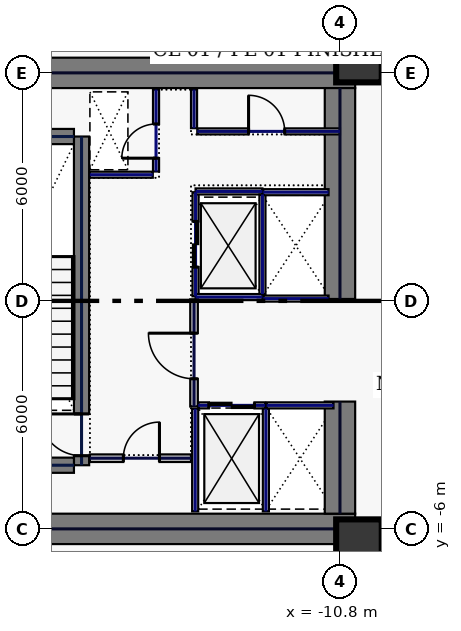
"""IFC4 building model, lengths in metres.
Left out: names, types, materials, properties, quantities, classifications, styles, units other than length and angle.
Written with IfcOpenShell. Run it as: python <this file> out.ifc"""

import sys

from ifc_helpers import new_model, si_unit, direction, frame, frame_2d, origin, origin_2d, place, context, subcontext, project, spatial, rectangle, hollow_rectangle, extrude, element, fill, save


model = new_model("IFC4")
c1 = context("Model", 3, precision=1e-05, world=origin(), true_north=direction((0.0, 1.0)))
c2 = subcontext(c1, "Body", "Model", "MODEL_VIEW")
j1 = project(units=[si_unit("LENGTHUNIT", "METRE"), si_unit("PLANEANGLEUNIT", "RADIAN")], contexts=[c1])
p1 = place(None, origin())
s1 = spatial("IfcSite", under=j1, at=p1, CompositionType="ELEMENT")
p2 = place(p1, origin())
s2 = spatial("IfcBuilding", under=s1, at=p2, CompositionType="ELEMENT")
p3 = place(p2, frame((0.0, 0.0, 39.4)))
s3 = spatial("IfcBuildingStorey", under=s2, at=p3, CompositionType="ELEMENT", Elevation=39.4)
for number, where, z_axis, x_axis in (
    (1, (-22.0, 6.0, 0.0), (0.0, 0.0, 1.0), (1.0, 0.0, 0.0)),
    (2, (-22.0, -6.0, 0.0), (0.0, 0.0, 1.0), (1.0, 0.0, 0.0)),
):
    element("IfcWall", number, at=place(p3, frame(where, z_axis=z_axis, x_axis=x_axis)), inside=s3, PredefinedType="SHEAR", context=c2, shape_type="SweptSolid", body=[
        extrude(rectangle(XDim=11.6, YDim=0.8, at=frame_2d((5.8, 0.0))), origin(), (0.0, 0.0, 1.0), 3.74),
    ])
p4 = place(p3, frame((-10.8, -5.6, 0.0), z_axis=(0.0, 0.0, 1.0), x_axis=(0.0, 1.0, 0.0)))
e3 = element("IfcWall", 3, at=p4, inside=s3, PredefinedType="SHEAR", context=c2, shape_type="SweptSolid", body=[
    extrude(rectangle(XDim=2.95, YDim=0.8, at=frame_2d((1.475, 0.0))), origin(), (0.0, 0.0, 1.0), 3.74),
])
p5 = place(p3, frame((-10.8, 0.05, 0.0), z_axis=(0.0, 0.0, 1.0), x_axis=(0.0, 1.0, 0.0)))
e4 = element("IfcWall", 4, at=p5, inside=s3, PredefinedType="SHEAR", context=c2, shape_type="SweptSolid", body=[
    extrude(rectangle(XDim=5.55, YDim=0.8, at=frame_2d((2.775, 0.0))), origin(), (0.0, 0.0, 1.0), 3.74),
])
p6 = place(p3, frame((-17.6, -4.325, 0.0), z_axis=(0.0, 0.0, 1.0), x_axis=(0.0, 1.0, 0.0)))
e5 = element("IfcWall", 5, at=p6, inside=s3, PredefinedType="SHEAR", context=c2, shape_type="SweptSolid", body=[
    extrude(rectangle(XDim=8.65, YDim=0.4, at=frame_2d((4.325, 0.0))), origin(), (0.0, 0.0, 1.0), 3.74),
])
p7 = place(p6, frame((0.25, 0.0, 0.0)))
e6 = element("IfcOpeningElement", 6, at=p7, cuts=e5, PredefinedType="OPENING", context=c2, shape_type="SweptSolid", body=[
    extrude(rectangle(XDim=1.1, YDim=2.2, at=frame_2d((0.55, 1.1))), frame((0.0, 0.21, 0.0), z_axis=(0.0, -1.0, 0.0), x_axis=(1.0, 0.0, 0.0)), (0.0, 0.0, 1.0), 0.42),
])
for number, where, z_axis, x_axis in (
    (7, (-21.2, -4.325, 0.0), (0.0, 0.0, 1.0), (1.0, 0.0, 0.0)),
    (8, (-21.2, 4.325, 0.0), (0.0, 0.0, 1.0), (1.0, 0.0, 0.0)),
):
    element("IfcWall", number, at=place(p3, frame(where, z_axis=z_axis, x_axis=x_axis)), inside=s3, PredefinedType="SHEAR", context=c2, shape_type="SweptSolid", body=[
        extrude(rectangle(XDim=3.4, YDim=0.4, at=frame_2d((1.7, 0.0))), origin(), (0.0, 0.0, 1.0), 3.74),
    ])
for number, where, z_axis, x_axis in (
    (9, (-10.3, -6.35, 0.0), (0.0, 0.0, 1.0), (1.0, 0.0, 0.0)),
    (10, (-10.3, 6.35, 0.0), (0.0, 0.0, 1.0), (1.0, 0.0, 0.0)),
):
    element("IfcColumn", number, at=place(p3, frame(where, z_axis=z_axis, x_axis=x_axis)), inside=s3, PredefinedType="COLUMN", context=c2, shape_type="SweptSolid", body=[
        extrude(hollow_rectangle(XDim=1.2, YDim=1.2, WallThickness=0.05, at=origin_2d()), origin(), (0.0, 0.0, 1.0), 3.74),
    ])
p8 = place(p3, frame((-14.6, 0.12, 0.0), z_axis=(0.0, 0.0, 1.0), x_axis=(0.0, 1.0, 0.0)))
e11 = element("IfcWall", 11, at=p8, inside=s3, PredefinedType="PARTITIONING", context=c2, shape_type="SweptSolid", body=[
    extrude(rectangle(XDim=2.74, YDim=0.16, at=frame_2d((1.37, 0.0))), origin(), (0.0, 0.0, 1.0), 3.74),
])
p9 = place(p8, frame((0.77, 0.0, 0.0)))
e12 = element("IfcOpeningElement", 12, at=p9, cuts=e11, PredefinedType="OPENING", context=c2, shape_type="SweptSolid", body=[
    extrude(rectangle(XDim=1.2, YDim=2.2, at=frame_2d((0.6, 1.1))), frame((0.0, 0.09, 0.0), z_axis=(0.0, -1.0, 0.0), x_axis=(1.0, 0.0, 0.0)), (0.0, 0.0, 1.0), 0.18),
])
for number, where, z_axis, x_axis in (
    (13, (-14.6, 0.1, 0.0), (0.0, 0.0, 1.0), (1.0, 0.0, 0.0)),
    (14, (-14.6, 2.88, 0.0), (0.0, 0.0, 1.0), (1.0, 0.0, 0.0)),
):
    element("IfcWall", number, at=place(p3, frame(where, z_axis=z_axis, x_axis=x_axis)), inside=s3, PredefinedType="PARTITIONING", context=c2, shape_type="SweptSolid", body=[
        extrude(rectangle(XDim=1.76, YDim=0.16, at=frame_2d((0.88, 0.0))), origin(), (0.0, 0.0, 1.0), 3.74),
    ])
p10 = place(p3, frame((-12.84, 0.18, 0.0), z_axis=(0.0, 0.0, 1.0), x_axis=(0.0, 1.0, 0.0)))
e15 = element("IfcWall", 15, at=p10, inside=s3, PredefinedType="PARTITIONING", context=c2, shape_type="SweptSolid", body=[
    extrude(rectangle(XDim=2.62, YDim=0.16, at=frame_2d((1.31, 0.0))), origin(), (0.0, 0.0, 1.0), 3.74),
])
p11 = place(p3, frame((-14.53, -2.75, 0.0), z_axis=(0.0, 0.0, 1.0), x_axis=(1.0, 0.0, 0.0)))
e16 = element("IfcWall", 16, at=p11, inside=s3, PredefinedType="PARTITIONING", context=c2, shape_type="SweptSolid", body=[
    extrude(rectangle(XDim=1.76, YDim=0.16, at=frame_2d((0.88, 0.0))), origin(), (0.0, 0.0, 1.0), 3.74),
])
p12 = place(p11, frame((0.28, 0.0, 0.0)))
e17 = element("IfcOpeningElement", 17, at=p12, cuts=e16, PredefinedType="OPENING", context=c2, shape_type="SweptSolid", body=[
    extrude(rectangle(XDim=1.2, YDim=2.2, at=frame_2d((0.6, 1.1))), frame((0.0, 0.09, 0.0), z_axis=(0.0, -1.0, 0.0), x_axis=(1.0, 0.0, 0.0)), (0.0, 0.0, 1.0), 0.18),
])
for number, where, z_axis, x_axis in (
    (18, (-12.75, -5.54, 0.0), (0.0, 0.0, 1.0), (0.0, 1.0, 0.0)),
    (19, (-14.61, -5.54, 0.0), (0.0, 0.0, 1.0), (0.0, 1.0, 0.0)),
):
    element("IfcWall", number, at=place(p3, frame(where, z_axis=z_axis, x_axis=x_axis)), inside=s3, PredefinedType="PARTITIONING", context=c2, shape_type="SweptSolid", body=[
        extrude(rectangle(XDim=2.7, YDim=0.16, at=frame_2d((1.35, 0.0))), origin(), (0.0, 0.0, 1.0), 3.74),
    ])
p13 = place(p3, frame((-12.73, -2.75, 0.0), z_axis=(0.0, 0.0, 1.0), x_axis=(1.0, 0.0, 0.0)))
e20 = element("IfcWall", 20, at=p13, inside=s3, PredefinedType="PARTITIONING", context=c2, shape_type="SweptSolid", body=[
    extrude(rectangle(XDim=1.76, YDim=0.16, at=frame_2d((0.88, 0.0))), origin(), (0.0, 0.0, 1.0), 3.74),
])
for number, where, z_axis, x_axis in (
    (21, (-12.82, 0.06, 0.0), (0.0, 0.0, 1.0), (1.0, 0.0, 0.0)),
    (22, (-12.82, 2.86, 0.0), (0.0, 0.0, 1.0), (1.0, 0.0, 0.0)),
):
    element("IfcWall", number, at=place(p3, frame(where, z_axis=z_axis, x_axis=x_axis)), inside=s3, PredefinedType="PARTITIONING", context=c2, shape_type="SweptSolid", body=[
        extrude(rectangle(XDim=1.72, YDim=0.16, at=frame_2d((0.86, 0.0))), origin(), (0.0, 0.0, 1.0), 3.74),
    ])
p14 = place(p3, frame((-15.64, 3.405, 0.0), z_axis=(0.0, 0.0, 1.0), x_axis=(0.0, 1.0, 0.0)))
e23 = element("IfcWall", 23, at=p14, inside=s3, PredefinedType="PARTITIONING", context=c2, shape_type="SweptSolid", body=[
    extrude(rectangle(XDim=2.155, YDim=0.16, at=frame_2d((1.078, 0.0))), origin(), (0.0, 0.0, 1.0), 3.74),
])
p15 = place(p14, frame((0.35, 0.0, 0.0)))
e24 = element("IfcOpeningElement", 24, at=p15, cuts=e23, PredefinedType="OPENING", context=c2, shape_type="SweptSolid", body=[
    extrude(rectangle(XDim=0.9, YDim=2.2, at=frame_2d((0.45, 1.1))), frame((0.0, 0.09, 0.0), z_axis=(0.0, -1.0, 0.0), x_axis=(1.0, 0.0, 0.0)), (0.0, 0.0, 1.0), 0.18),
])
p16 = place(p3, frame((-17.38, 3.32, 0.0), z_axis=(0.0, 0.0, 1.0), x_axis=(1.0, 0.0, 0.0)))
e25 = element("IfcWall", 25, at=p16, inside=s3, PredefinedType="PARTITIONING", context=c2, shape_type="SweptSolid", body=[
    extrude(rectangle(XDim=1.655, YDim=0.16, at=frame_2d((0.827, 0.0))), origin(), (0.0, 0.0, 1.0), 3.74),
])
p17 = place(p3, frame((-17.38, -4.14, 0.0), z_axis=(0.0, 0.0, 1.0), x_axis=(1.0, 0.0, 0.0)))
e26 = element("IfcWall", 26, at=p17, inside=s3, PredefinedType="SOLIDWALL", context=c2, shape_type="SweptSolid", body=[
    extrude(rectangle(XDim=2.66, YDim=0.2, at=frame_2d((1.33, 0.0))), origin(), (0.0, 0.0, 1.0), 3.74),
])
p18 = place(p17, frame((0.88, 0.0, 0.0)))
e27 = element("IfcOpeningElement", 27, at=p18, cuts=e26, PredefinedType="OPENING", context=c2, shape_type="SweptSolid", body=[
    extrude(rectangle(XDim=0.95, YDim=2.2, at=frame_2d((0.475, 1.1))), frame((0.0, 0.11, 0.0), z_axis=(0.0, -1.0, 0.0), x_axis=(1.0, 0.0, 0.0)), (0.0, 0.0, 1.0), 0.22),
])
p19 = place(p3, frame((-14.555, 4.46, 0.0), z_axis=(0.0, 0.0, 1.0), x_axis=(1.0, 0.0, 0.0)))
e28 = element("IfcWall", 28, at=p19, inside=s3, PredefinedType="PARTITIONING", context=c2, shape_type="SweptSolid", body=[
    extrude(rectangle(XDim=3.755, YDim=0.16, at=frame_2d((1.877, 0.0))), origin(), (0.0, 0.0, 1.0), 3.74),
])
p20 = place(p19, frame((1.35, 0.0, 0.0)))
e29 = element("IfcOpeningElement", 29, at=p20, cuts=e28, PredefinedType="OPENING", context=c2, shape_type="SweptSolid", body=[
    extrude(rectangle(XDim=0.95, YDim=2.2, at=frame_2d((0.475, 1.1))), frame((0.0, 0.09, 0.0), z_axis=(0.0, -1.0, 0.0), x_axis=(1.0, 0.0, 0.0)), (0.0, 0.0, 1.0), 0.18),
])
p21 = place(p3, frame((-14.64, 4.545, 0.0), z_axis=(0.0, 0.0, 1.0), x_axis=(0.0, 1.0, 0.0)))
e30 = element("IfcWall", 30, at=p21, inside=s3, PredefinedType="PARTITIONING", context=c2, shape_type="SweptSolid", body=[
    extrude(rectangle(XDim=1.015, YDim=0.16, at=frame_2d((0.508, 0.0))), origin(), (0.0, 0.0, 1.0), 3.74),
])
p22 = place(p3, frame((-14.64, -2.78, 0.0), z_axis=(0.0, 0.0, 1.0), x_axis=(0.0, 1.0, 0.0)))
e31 = element("IfcWall", 31, at=p22, inside=s3, PredefinedType="SOLIDWALL", context=c2, shape_type="SweptSolid", body=[
    extrude(rectangle(XDim=2.82, YDim=0.2, at=frame_2d((1.41, 0.0))), origin(), (0.0, 0.0, 1.0), 3.74),
])
p23 = place(p22, frame((0.73, 0.0, 0.0)))
e32 = element("IfcOpeningElement", 32, at=p23, cuts=e31, PredefinedType="OPENING", context=c2, shape_type="SweptSolid", body=[
    extrude(rectangle(XDim=1.2, YDim=2.2, at=frame_2d((0.6, 1.1))), frame((0.0, 0.11, 0.0), z_axis=(0.0, -1.0, 0.0), x_axis=(1.0, 0.0, 0.0)), (0.0, 0.0, 1.0), 0.22),
])
p24 = place(p3, frame((-10.58, -7.785, 0.0), z_axis=(0.0, 0.0, 1.0), x_axis=(0.0, 1.0, 0.0)))
e33 = element("IfcWall", 33, at=p24, inside=s3, PredefinedType="PARTITIONING", context=c2, shape_type="SweptSolid", body=[
    extrude(rectangle(XDim=1.365, YDim=0.16, at=frame_2d((0.683, 0.0))), origin(), (0.0, 0.0, 1.0), 1.535),
])
p25 = place(p3, frame((-10.58, 6.42, 0.0), z_axis=(0.0, 0.0, 1.0), x_axis=(0.0, 1.0, 0.0)))
e34 = element("IfcWall", 34, at=p25, inside=s3, PredefinedType="PARTITIONING", context=c2, shape_type="SweptSolid", body=[
    extrude(rectangle(XDim=1.465, YDim=0.16, at=frame_2d((0.732, 0.0))), origin(), (0.0, 0.0, 1.0), 3.74),
])
p26 = place(p7, origin())
e35 = element("IfcDoor", 35, at=p26, inside=s3, OperationType="SINGLE_SWING_RIGHT", PredefinedType="DOOR", context=c2, shape_type="SweptSolid", body=[
    extrude(rectangle(XDim=1.1, YDim=2.2, at=frame_2d((0.55, 1.1))), frame((0.0, 0.025, 0.0), z_axis=(0.0, -1.0, 0.0), x_axis=(1.0, 0.0, 0.0)), (0.0, 0.0, 1.0), 0.05),
])
fill(e6, e35)
p27 = place(p9, origin())
e36 = element("IfcDoor", 36, at=p27, inside=s3, OperationType="SLIDING_TO_LEFT", PredefinedType="DOOR", context=c2, shape_type="SweptSolid", body=[
    extrude(rectangle(XDim=1.2, YDim=2.2, at=frame_2d((0.6, 1.1))), frame((0.0, 0.025, 0.0), z_axis=(0.0, -1.0, 0.0), x_axis=(1.0, 0.0, 0.0)), (0.0, 0.0, 1.0), 0.05),
])
fill(e12, e36)
p28 = place(p12, origin())
e37 = element("IfcDoor", 37, at=p28, inside=s3, OperationType="SLIDING_TO_LEFT", PredefinedType="DOOR", context=c2, shape_type="SweptSolid", body=[
    extrude(rectangle(XDim=1.2, YDim=2.2, at=frame_2d((0.6, 1.1))), frame((0.0, 0.025, 0.0), z_axis=(0.0, -1.0, 0.0), x_axis=(1.0, 0.0, 0.0)), (0.0, 0.0, 1.0), 0.05),
])
fill(e17, e37)
p29 = place(p15, origin())
e38 = element("IfcDoor", 38, at=p29, inside=s3, OperationType="SINGLE_SWING_LEFT", PredefinedType="DOOR", context=c2, shape_type="SweptSolid", body=[
    extrude(rectangle(XDim=0.9, YDim=2.2, at=frame_2d((0.45, 1.1))), frame((0.0, 0.025, 0.0), z_axis=(0.0, -1.0, 0.0), x_axis=(1.0, 0.0, 0.0)), (0.0, 0.0, 1.0), 0.05),
])
fill(e24, e38)
p30 = place(p18, origin())
e39 = element("IfcDoor", 39, at=p30, inside=s3, OperationType="SINGLE_SWING_RIGHT", PredefinedType="DOOR", context=c2, shape_type="SweptSolid", body=[
    extrude(rectangle(XDim=0.95, YDim=2.2, at=frame_2d((0.475, 1.1))), frame((0.0, 0.025, 0.0), z_axis=(0.0, -1.0, 0.0), x_axis=(1.0, 0.0, 0.0)), (0.0, 0.0, 1.0), 0.05),
])
fill(e27, e39)
p31 = place(p20, origin())
e40 = element("IfcDoor", 40, at=p31, inside=s3, OperationType="SINGLE_SWING_LEFT", PredefinedType="DOOR", context=c2, shape_type="SweptSolid", body=[
    extrude(rectangle(XDim=0.95, YDim=2.2, at=frame_2d((0.475, 1.1))), frame((0.0, 0.025, 0.0), z_axis=(0.0, -1.0, 0.0), x_axis=(1.0, 0.0, 0.0)), (0.0, 0.0, 1.0), 0.05),
])
fill(e29, e40)
p32 = place(p23, origin())
e41 = element("IfcDoor", 41, at=p32, inside=s3, OperationType="SINGLE_SWING_RIGHT", PredefinedType="DOOR", context=c2, shape_type="SweptSolid", body=[
    extrude(rectangle(XDim=1.2, YDim=2.2, at=frame_2d((0.6, 1.1))), frame((0.0, 0.025, 0.0), z_axis=(0.0, -1.0, 0.0), x_axis=(1.0, 0.0, 0.0)), (0.0, 0.0, 1.0), 0.05),
])
fill(e32, e41)
save(model, sys.argv[1])
